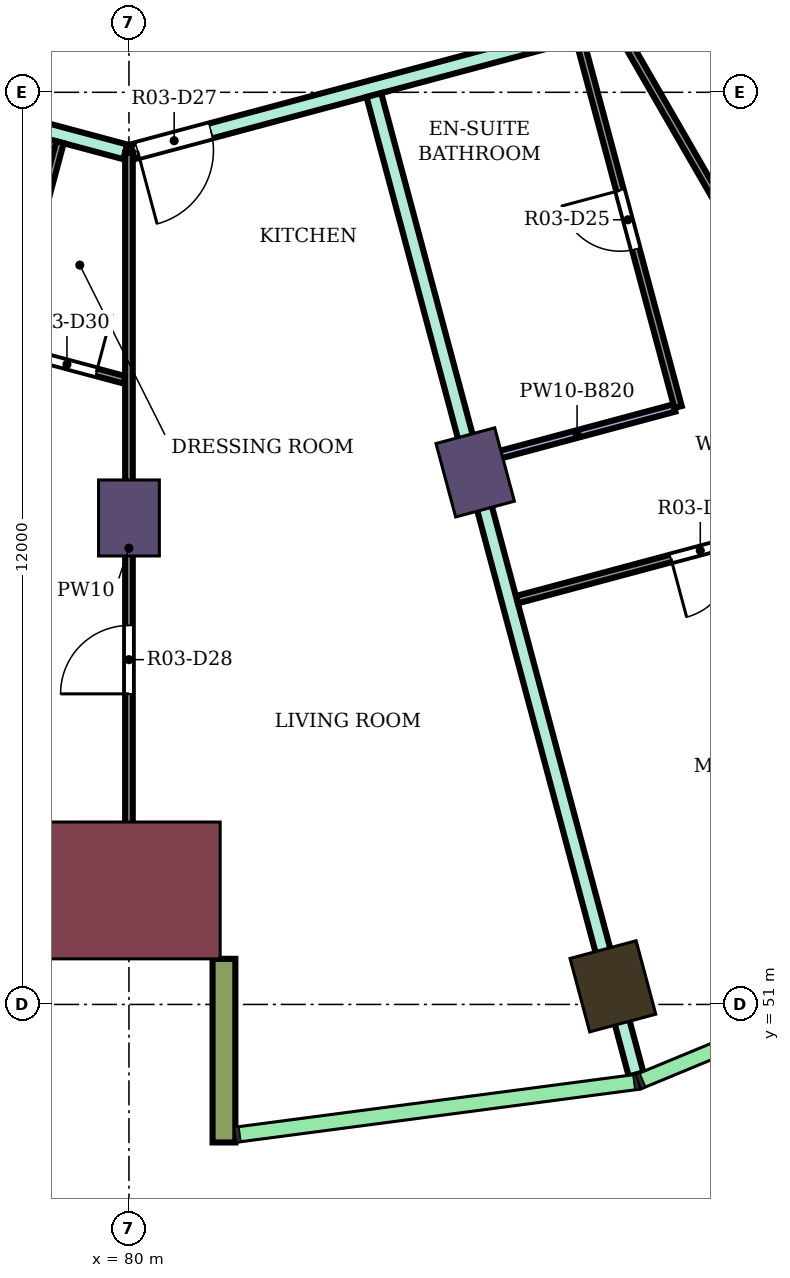
"""IFC4 building model, lengths in metres.
Left out: names, types, materials, properties, quantities, classifications, styles, units other than length and angle.
Written with IfcOpenShell. Run it as: python <this file> out.ifc"""

import sys

from ifc_helpers import new_model, si_unit, direction, frame, frame_2d, origin, origin_2d, place, context, subcontext, project, spatial, rectangle, extrude, element, fill, save


model = new_model("IFC4")
c1 = context("Model", 3, precision=1e-05, world=origin(), true_north=direction((0.0, 1.0)))
c2 = subcontext(c1, "Body", "Model", "MODEL_VIEW")
j1 = project(units=[si_unit("LENGTHUNIT", "METRE"), si_unit("PLANEANGLEUNIT", "RADIAN")], contexts=[c1])
p1 = place(None, origin())
s1 = spatial("IfcSite", under=j1, at=p1, CompositionType="ELEMENT")
p2 = place(p1, origin())
s2 = spatial("IfcBuilding", under=s1, at=p2, CompositionType="ELEMENT")
p3 = place(p2, frame((0.0, 0.0, 190.5)))
s3 = spatial("IfcBuildingStorey", under=s2, at=p3, CompositionType="ELEMENT", Elevation=190.5)
p4 = place(p3, frame((86.367, 51.238, 0.0), z_axis=(0.0, 0.0, 1.0), x_axis=(0.258819045103, -0.965925826289, 0.0)))
e1 = element("IfcColumn", 1, at=p4, inside=s3, PredefinedType="COLUMN", context=c2, shape_type="SweptSolid", body=[
    extrude(rectangle(XDim=1.0, YDim=0.9, at=origin_2d()), origin(), (0.0, 0.0, 1.0), 4.1),
])
for number, where, z_axis, x_axis in (
    (2, (80.0, 57.4, 0.0), (0.0, 0.0, 1.0), (0.0, -1.0, 0.0)),
    (3, (84.555, 58.0, 0.0), (0.0, 0.0, 1.0), (0.259, -0.966, 0.0)),
):
    element("IfcColumn", number, at=place(p3, frame(where, z_axis=z_axis, x_axis=x_axis)), inside=s3, PredefinedType="COLUMN", context=c2, shape_type="SweptSolid", body=[
        extrude(rectangle(XDim=1.0, YDim=0.8, at=origin_2d()), origin(), (0.0, 0.0, 1.0), 4.1),
    ])
p5 = place(p3, frame((80.0, 52.5, 0.0), z_axis=(0.0, 0.0, 1.0), x_axis=(0.0, -1.0, 0.0)))
e4 = element("IfcColumn", 4, at=p5, inside=s3, PredefinedType="COLUMN", context=c2, shape_type="SweptSolid", body=[
    extrude(rectangle(XDim=1.8, YDim=2.4, at=origin_2d()), origin(), (0.0, 0.0, 1.0), 4.1),
])
p6 = place(p3, frame((81.25, 51.6, 0.0), z_axis=(0.0, 0.0, 1.0), x_axis=(0.0, -1.0, 0.0)))
e5 = element("IfcWall", 5, at=p6, inside=s3, PredefinedType="NOTDEFINED", context=c2, shape_type="SweptSolid", body=[
    extrude(rectangle(XDim=2.416, YDim=0.3, at=frame_2d((1.208, 0.0))), origin(), (0.0, 0.0, 1.0), 4.1),
])
p7 = place(p3, frame((73.947, 63.826, 0.0), z_axis=(0.0, 0.0, 1.0), x_axis=(0.965898432367, -0.258921258979, 0.0)))
e6 = element("IfcWall", 6, at=p7, inside=s3, PredefinedType="PARTITIONING", context=c2, shape_type="SweptSolid", body=[
    extrude(rectangle(XDim=6.217, YDim=0.2, at=frame_2d((3.108, 0.0))), origin(), (0.0, 0.0, 1.0), 3.65),
])
p8 = place(p7, frame((1.424, 0.0, 0.0)))
e7 = element("IfcOpeningElement", 7, at=p8, cuts=e6, PredefinedType="OPENING", context=c2, shape_type="SweptSolid", body=[
    extrude(rectangle(XDim=1.0, YDim=2.1, at=frame_2d((0.5, 1.05))), frame((0.0, 0.11, 0.0), z_axis=(0.0, -1.0, 0.0), x_axis=(1.0, 0.0, 0.0)), (0.0, 0.0, 1.0), 0.22),
])
p9 = place(p3, frame((80.048, 62.217, 0.0), z_axis=(0.0, 0.0, 1.0), x_axis=(0.965967276872, 0.258664299841, 0.0)))
e8 = element("IfcWall", 8, at=p9, inside=s3, PredefinedType="PARTITIONING", context=c2, shape_type="SweptSolid", body=[
    extrude(rectangle(XDim=6.007, YDim=0.2, at=frame_2d((3.003, 0.0))), origin(), (0.0, 0.0, 1.0), 3.65),
])
p10 = place(p9, frame((0.066, 0.0, 0.0)))
e9 = element("IfcOpeningElement", 9, at=p10, cuts=e8, PredefinedType="OPENING", context=c2, shape_type="SweptSolid", body=[
    extrude(rectangle(XDim=1.0, YDim=2.1, at=frame_2d((0.5, 1.05))), frame((0.0, 0.11, 0.0), z_axis=(0.0, -1.0, 0.0), x_axis=(1.0, 0.0, 0.0)), (0.0, 0.0, 1.0), 0.22),
])
p11 = place(p3, frame((83.222, 62.964, 0.0), z_axis=(0.0, 0.0, 1.0), x_axis=(0.25865252128, -0.965970430829, 0.0)))
e10 = element("IfcWall", 10, at=p11, inside=s3, PredefinedType="PARTITIONING", context=c2, shape_type="SweptSolid", body=[
    extrude(rectangle(XDim=13.338, YDim=0.2, at=frame_2d((6.669, 0.0))), origin(), (0.0, 0.0, 1.0), 3.65),
])
p12 = place(p3, frame((76.147, 60.234, 0.0), z_axis=(0.0, 0.0, 1.0), x_axis=(0.965925861199, -0.258818914816, 0.0)))
e11 = element("IfcWall", 11, at=p12, inside=s3, PredefinedType="PARTITIONING", context=c2, shape_type="SweptSolid", body=[
    extrude(rectangle(XDim=3.929, YDim=0.1, at=frame_2d((1.964, 0.0))), origin(), (0.0, 0.0, 1.0), 3.65),
])
p13 = place(p12, frame((0.7, 0.0, 0.0)))
e12 = element("IfcOpeningElement", 12, at=p13, cuts=e11, PredefinedType="OPENING", context=c2, shape_type="SweptSolid", body=[
    extrude(rectangle(XDim=0.8, YDim=2.1, at=frame_2d((0.4, 1.05))), frame((0.0, 0.06, 0.0), z_axis=(0.0, -1.0, 0.0), x_axis=(1.0, 0.0, 0.0)), (0.0, 0.0, 1.0), 0.12),
])
p14 = place(p12, frame((2.745, 0.0, 0.0)))
e13 = element("IfcOpeningElement", 13, at=p14, cuts=e11, PredefinedType="OPENING", context=c2, shape_type="SweptSolid", body=[
    extrude(rectangle(XDim=0.8, YDim=2.1, at=frame_2d((0.4, 1.05))), frame((0.0, 0.06, 0.0), z_axis=(0.0, -1.0, 0.0), x_axis=(1.0, 0.0, 0.0)), (0.0, 0.0, 1.0), 0.12),
])
p15 = place(p3, frame((78.382, 59.687, 0.0), z_axis=(0.0, 0.0, 1.0), x_axis=(0.258629573817, 0.965976575051, 0.0)))
e14 = element("IfcWall", 14, at=p15, inside=s3, PredefinedType="PARTITIONING", context=c2, shape_type="SweptSolid", body=[
    extrude(rectangle(XDim=2.75, YDim=0.1, at=frame_2d((1.375, 0.0))), origin(), (0.0, 0.0, 1.0), 3.65),
])
p16 = place(p3, frame((80.0, 51.8, 0.0), z_axis=(0.0, 0.0, 1.0), x_axis=(0.0, 1.0, 0.0)))
e15 = element("IfcWall", 15, at=p16, inside=s3, PredefinedType="PARTITIONING", context=c2, shape_type="SweptSolid", body=[
    extrude(rectangle(XDim=10.404, YDim=0.1, at=frame_2d((5.202, 0.0))), origin(), (0.0, 0.0, 1.0), 3.65),
])
p17 = place(p16, frame((3.286, 0.0, 0.0)))
e16 = element("IfcOpeningElement", 16, at=p17, cuts=e15, PredefinedType="OPENING", context=c2, shape_type="SweptSolid", body=[
    extrude(rectangle(XDim=0.9, YDim=2.1, at=frame_2d((0.45, 1.05))), frame((0.0, 0.06, 0.0), z_axis=(0.0, -1.0, 0.0), x_axis=(1.0, 0.0, 0.0)), (0.0, 0.0, 1.0), 0.12),
])
p18 = place(p3, frame((84.615, 58.161, 0.0), z_axis=(0.0, 0.0, 1.0), x_axis=(0.965902408875, 0.258906424273, 0.0)))
e17 = element("IfcWall", 17, at=p18, inside=s3, PredefinedType="PARTITIONING", context=c2, shape_type="SweptSolid", body=[
    extrude(rectangle(XDim=2.651, YDim=0.1, at=frame_2d((1.325, 0.0))), origin(), (0.0, 0.0, 1.0), 3.28),
])
p19 = place(p3, frame((85.108, 56.326, 0.0), z_axis=(0.0, 0.0, 1.0), x_axis=(0.965919870225, 0.258841272413, 0.0)))
e18 = element("IfcWall", 18, at=p19, inside=s3, PredefinedType="PARTITIONING", context=c2, shape_type="SweptSolid", body=[
    extrude(rectangle(XDim=5.027, YDim=0.1, at=frame_2d((2.514, 0.0))), origin(), (0.0, 0.0, 1.0), 3.65),
])
p20 = place(p19, frame((2.094, 0.0, 0.0)))
e19 = element("IfcOpeningElement", 19, at=p20, cuts=e18, PredefinedType="OPENING", context=c2, shape_type="SweptSolid", body=[
    extrude(rectangle(XDim=0.8, YDim=2.1, at=frame_2d((0.4, 1.05))), frame((0.0, 0.06, 0.0), z_axis=(0.0, -1.0, 0.0), x_axis=(1.0, 0.0, 0.0)), (0.0, 0.0, 1.0), 0.12),
])
p21 = place(p3, frame((85.904, 63.786, 0.0), z_axis=(0.0, 0.0, 1.0), x_axis=(0.258857329124, -0.965915567303, 0.0)))
e20 = element("IfcWall", 20, at=p21, inside=s3, PredefinedType="PARTITIONING", context=c2, shape_type="SweptSolid", body=[
    extrude(rectangle(XDim=5.1, YDim=0.1, at=frame_2d((2.55, 0.0))), origin(), (0.0, 0.0, 1.0), 3.65),
])
p22 = place(p21, frame((2.15, 0.0, 0.0)))
e21 = element("IfcOpeningElement", 21, at=p22, cuts=e20, PredefinedType="OPENING", context=c2, shape_type="SweptSolid", body=[
    extrude(rectangle(XDim=0.8, YDim=2.1, at=frame_2d((0.4, 1.05))), frame((0.0, 0.06, 0.0), z_axis=(0.0, -1.0, 0.0), x_axis=(1.0, 0.0, 0.0)), (0.0, 0.0, 1.0), 0.12),
])
p23 = place(p3, frame((86.461, 63.81, 0.0), z_axis=(0.0, 0.0, 1.0), x_axis=(0.499911751641, -0.866076348004, 0.0)))
e22 = element("IfcWall", 22, at=p23, inside=s3, PredefinedType="PARTITIONING", context=c2, shape_type="SweptSolid", body=[
    extrude(rectangle(XDim=12.876, YDim=0.1, at=frame_2d((6.438, 0.0))), origin(), (0.0, 0.0, 1.0), 3.65),
])
p24 = place(p23, frame((9.514, 0.0, 0.0)))
e23 = element("IfcOpeningElement", 23, at=p24, cuts=e22, PredefinedType="OPENING", context=c2, shape_type="SweptSolid", body=[
    extrude(rectangle(XDim=0.9, YDim=2.1, at=frame_2d((0.45, 1.05))), frame((0.0, 0.06, 0.0), z_axis=(0.0, -1.0, 0.0), x_axis=(1.0, 0.0, 0.0)), (0.0, 0.0, 1.0), 0.12),
])
p25 = place(p22, frame((0.8, 0.0, 0.0), z_axis=(0.0, 0.0, 1.0), x_axis=(-1.0, 0.0, 0.0)))
e24 = element("IfcDoor", 24, at=p25, inside=s3, OperationType="SINGLE_SWING_RIGHT", PredefinedType="DOOR", context=c2, shape_type="SweptSolid", body=[
    extrude(rectangle(XDim=0.8, YDim=2.1, at=frame_2d((0.4, 1.05))), frame((0.0, 0.025, 0.0), z_axis=(0.0, -1.0, 0.0), x_axis=(1.0, 0.0, 0.0)), (0.0, 0.0, 1.0), 0.05),
])
fill(e21, e24)
p26 = place(p20, frame((0.8, 0.0, 0.0), z_axis=(0.0, 0.0, 1.0), x_axis=(-1.0, 0.0, 0.0)))
e25 = element("IfcDoor", 25, at=p26, inside=s3, OperationType="SINGLE_SWING_RIGHT", PredefinedType="DOOR", context=c2, shape_type="SweptSolid", body=[
    extrude(rectangle(XDim=0.8, YDim=2.1, at=frame_2d((0.4, 1.05))), frame((0.0, 0.025, 0.0), z_axis=(0.0, -1.0, 0.0), x_axis=(1.0, 0.0, 0.0)), (0.0, 0.0, 1.0), 0.05),
])
fill(e19, e25)
p27 = place(p10, frame((1.0, 0.0, 0.0), z_axis=(0.0, 0.0, 1.0), x_axis=(-1.0, 0.0, 0.0)))
e26 = element("IfcDoor", 26, at=p27, inside=s3, OperationType="SINGLE_SWING_RIGHT", PredefinedType="DOOR", context=c2, shape_type="SweptSolid", body=[
    extrude(rectangle(XDim=1.0, YDim=2.1, at=frame_2d((0.5, 1.05))), frame((0.0, 0.025, 0.0), z_axis=(0.0, -1.0, 0.0), x_axis=(1.0, 0.0, 0.0)), (0.0, 0.0, 1.0), 0.05),
])
fill(e9, e26)
p28 = place(p17, origin())
e27 = element("IfcDoor", 27, at=p28, inside=s3, OperationType="SINGLE_SWING_LEFT", PredefinedType="DOOR", context=c2, shape_type="SweptSolid", body=[
    extrude(rectangle(XDim=0.9, YDim=2.1, at=frame_2d((0.45, 1.05))), frame((0.0, 0.025, 0.0), z_axis=(0.0, -1.0, 0.0), x_axis=(1.0, 0.0, 0.0)), (0.0, 0.0, 1.0), 0.05),
])
fill(e16, e27)
p29 = place(p14, origin())
e28 = element("IfcDoor", 28, at=p29, inside=s3, OperationType="SINGLE_SWING_RIGHT", PredefinedType="DOOR", context=c2, shape_type="SweptSolid", body=[
    extrude(rectangle(XDim=0.8, YDim=2.1, at=frame_2d((0.4, 1.05))), frame((0.0, 0.025, 0.0), z_axis=(0.0, -1.0, 0.0), x_axis=(1.0, 0.0, 0.0)), (0.0, 0.0, 1.0), 0.05),
])
fill(e13, e28)
save(model, sys.argv[1])
